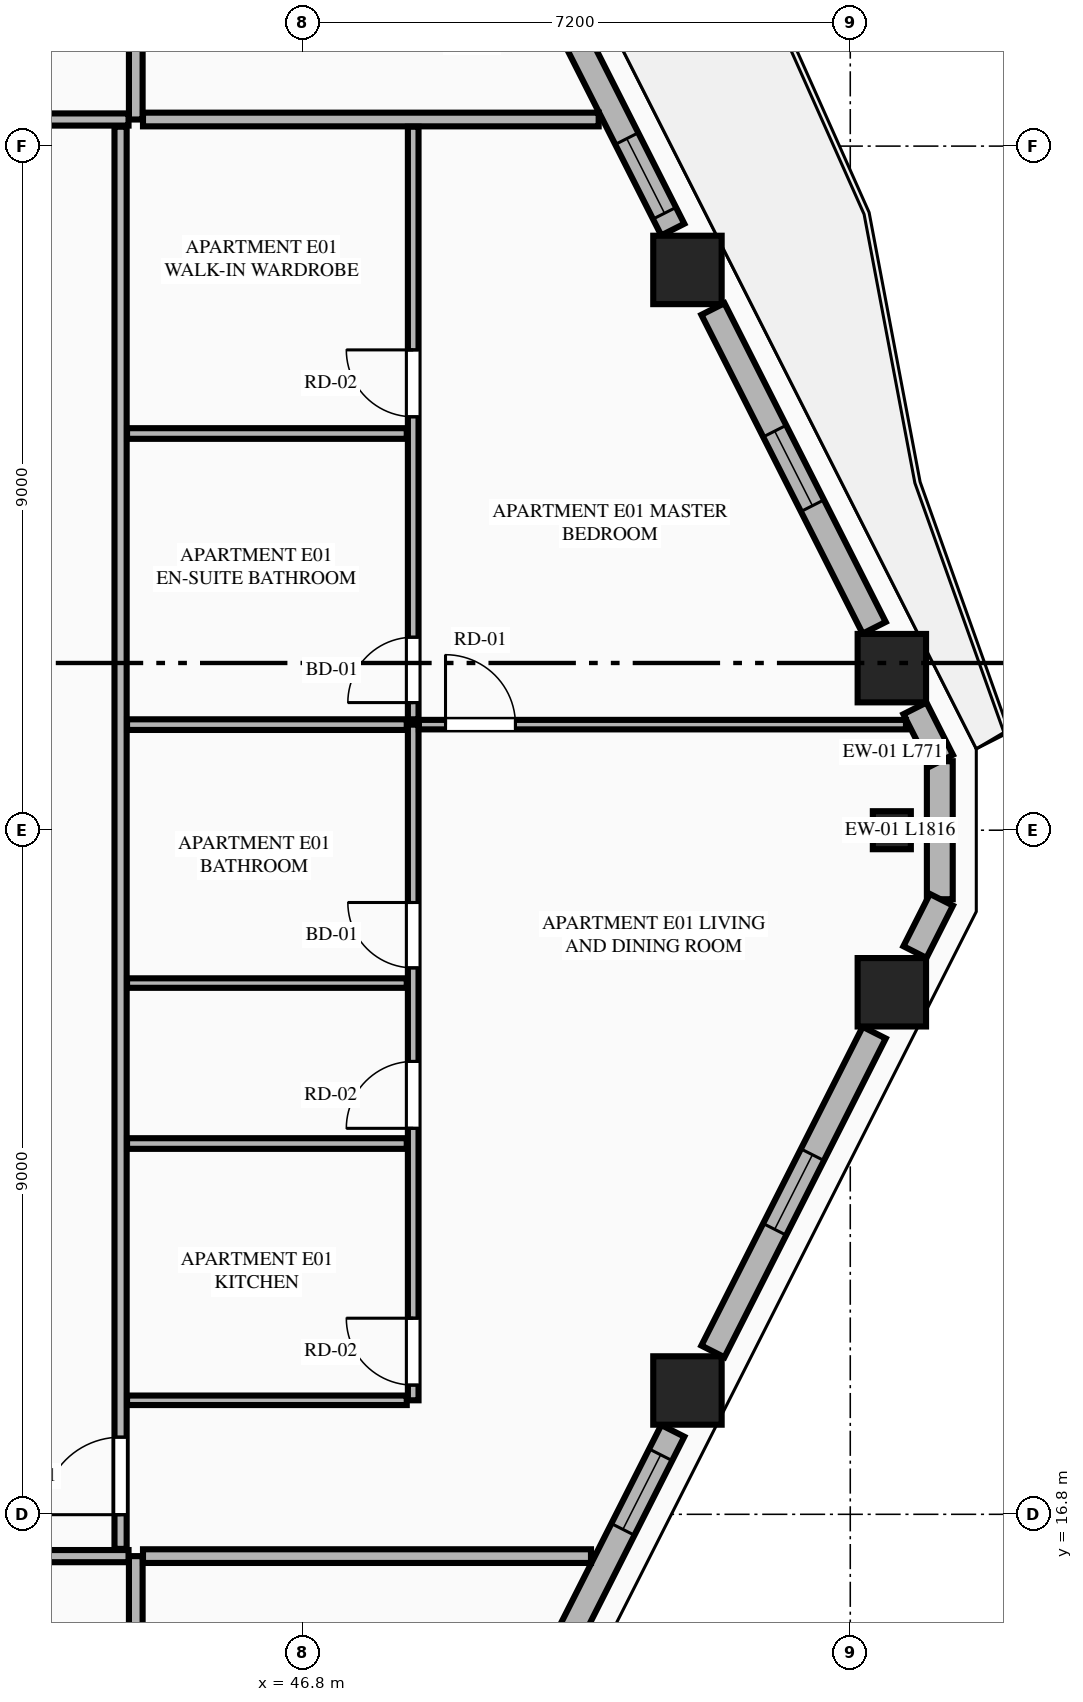
"""IFC4 building model, lengths in metres.
Left out: names, types, materials, properties, quantities, classifications, styles, units other than length and angle.
Written with IfcOpenShell. Run it as: python <this file> out.ifc"""

import sys

from ifc_helpers import new_model, si_unit, direction, frame, frame_2d, origin, origin_2d, place, context, subcontext, project, spatial, rectangle, extrude, element, fill, save


model = new_model("IFC4")
c1 = context("Model", 3, precision=1e-05, world=origin(), true_north=direction((0.0, 1.0)))
c2 = subcontext(c1, "Body", "Model", "MODEL_VIEW")
j1 = project(units=[si_unit("LENGTHUNIT", "METRE"), si_unit("PLANEANGLEUNIT", "RADIAN")], contexts=[c1])
p1 = place(None, origin())
s1 = spatial("IfcSite", under=j1, at=p1, CompositionType="ELEMENT")
p2 = place(p1, origin())
s2 = spatial("IfcBuilding", under=s1, at=p2, CompositionType="ELEMENT")
p3 = place(p2, frame((0.0, 0.0, 175.45)))
s3 = spatial("IfcBuildingStorey", under=s2, at=p3, CompositionType="ELEMENT", Elevation=175.45)
for number, where, z_axis, x_axis in (
    (1, (51.858, 18.429, 0.0), (0.0, 0.0, 1.0), (1.0, 0.0, 0.0)),
    (2, (54.547, 23.668, 0.0), (0.0, 0.0, 1.0), (1.0, 0.0, 0.0)),
    (3, (54.547, 27.932, 0.0), (0.0, 0.0, 1.0), (1.0, 0.0, 0.0)),
    (4, (51.858, 33.171, 0.0), (0.0, 0.0, 1.0), (1.0, 0.0, 0.0)),
):
    element("IfcColumn", number, at=place(p3, frame(where, z_axis=z_axis, x_axis=x_axis)), inside=s3, PredefinedType="COLUMN", context=c2, shape_type="SweptSolid", body=[
        extrude(rectangle(XDim=0.9, YDim=0.9, at=origin_2d()), origin(), (0.0, 0.0, 1.0), 3.55),
    ])
p4 = place(p3, frame((54.547, 25.8, 0.0), z_axis=(0.0, 0.0, 1.0), x_axis=(0.0, 1.0, 0.0)))
e5 = element("IfcColumn", 5, at=p4, inside=s3, PredefinedType="PILASTER", context=c2, shape_type="SweptSolid", body=[
    extrude(rectangle(XDim=0.5, YDim=0.35, at=origin_2d()), origin(), (0.0, 0.0, 1.0), 3.55),
])
p5 = place(p3, frame((55.178, 24.892, 0.0), z_axis=(0.0, 0.0, 1.0), x_axis=(0.0, 1.0, 0.0)))
e6 = element("IfcWall", 6, at=p5, inside=s3, PredefinedType="STANDARD", context=c2, shape_type="SweptSolid", body=[
    extrude(rectangle(XDim=1.816, YDim=0.34, at=frame_2d((0.908, 0.0))), origin(), (0.0, 0.0, 1.0), 3.35),
])
p6 = place(p3, frame((49.448, 13.517, 0.0), z_axis=(0.0, 0.0, 1.0), x_axis=(0.451544279509, 0.892248711763, 0.0)))
e7 = element("IfcWall", 7, at=p6, inside=s3, PredefinedType="STANDARD", context=c2, shape_type="SweptSolid", body=[
    extrude(rectangle(XDim=4.91, YDim=0.34, at=frame_2d((2.455, 0.0))), origin(), (0.0, 0.0, 1.0), 2.883),
])
p7 = place(p6, frame((0.851, 0.0, 0.75)))
e8 = element("IfcOpeningElement", 8, at=p7, cuts=e7, PredefinedType="OPENING", context=c2, shape_type="SweptSolid", body=[
    extrude(rectangle(XDim=1.1, YDim=1.983, at=frame_2d((0.55, 0.991))), frame((0.0, 0.18, 0.0), z_axis=(0.0, -1.0, 0.0), x_axis=(1.0, 0.0, 0.0)), (0.0, 0.0, 1.0), 0.36),
])
p8 = place(p6, frame((3.457, 0.0, 0.75)))
e9 = element("IfcOpeningElement", 9, at=p8, cuts=e7, PredefinedType="OPENING", context=c2, shape_type="SweptSolid", body=[
    extrude(rectangle(XDim=1.1, YDim=1.983, at=frame_2d((0.55, 0.991))), frame((0.0, 0.18, 0.0), z_axis=(0.0, -1.0, 0.0), x_axis=(1.0, 0.0, 0.0)), (0.0, 0.0, 1.0), 0.36),
])
p9 = place(p3, frame((52.193, 18.943, 0.0), z_axis=(0.0, 0.0, 1.0), x_axis=(0.451447222193, 0.892297823361, 0.0)))
e10 = element("IfcWall", 10, at=p9, inside=s3, PredefinedType="STANDARD", context=c2, shape_type="SweptSolid", body=[
    extrude(rectangle(XDim=4.7, YDim=0.34, at=frame_2d((2.35, 0.0))), origin(), (0.0, 0.0, 1.0), 2.883),
])
p10 = place(p9, frame((1.8, 0.0, 0.75)))
e11 = element("IfcOpeningElement", 11, at=p10, cuts=e10, PredefinedType="OPENING", context=c2, shape_type="SweptSolid", body=[
    extrude(rectangle(XDim=1.1, YDim=1.983, at=frame_2d((0.55, 0.991))), frame((0.0, 0.18, 0.0), z_axis=(0.0, -1.0, 0.0), x_axis=(1.0, 0.0, 0.0)), (0.0, 0.0, 1.0), 0.36),
])
for number, where, z_axis, x_axis in (
    (12, (54.851, 24.197, 0.0), (0.0, 0.0, 1.0), (0.451, 0.892, 0.0)),
    (13, (55.199, 26.715, 0.0), (0.0, 0.0, 1.0), (-0.451, 0.892, 0.0)),
):
    element("IfcWall", number, at=place(p3, frame(where, z_axis=z_axis, x_axis=x_axis)), inside=s3, PredefinedType="STANDARD", context=c2, shape_type="SweptSolid", body=[
        extrude(rectangle(XDim=0.771, YDim=0.34, at=frame_2d((0.385, 0.0))), origin(), (0.0, 0.0, 1.0), 3.35),
    ])
p11 = place(p3, frame((54.315, 28.463, 0.0), z_axis=(0.0, 0.0, 1.0), x_axis=(-0.451426298588, 0.892308409096, 0.0)))
e14 = element("IfcWall", 14, at=p11, inside=s3, PredefinedType="STANDARD", context=c2, shape_type="SweptSolid", body=[
    extrude(rectangle(XDim=4.7, YDim=0.34, at=frame_2d((2.35, 0.0))), origin(), (0.0, 0.0, 1.0), 2.883),
])
p12 = place(p11, frame((1.8, 0.0, 0.75)))
e15 = element("IfcOpeningElement", 15, at=p12, cuts=e14, PredefinedType="OPENING", context=c2, shape_type="SweptSolid", body=[
    extrude(rectangle(XDim=1.1, YDim=1.983, at=frame_2d((0.55, 0.991))), frame((0.0, 0.18, 0.0), z_axis=(0.0, -1.0, 0.0), x_axis=(1.0, 0.0, 0.0)), (0.0, 0.0, 1.0), 0.36),
])
p13 = place(p3, frame((51.665, 33.702, 0.0), z_axis=(0.0, 0.0, 1.0), x_axis=(-0.451524246964, 0.89225884944, 0.0)))
e16 = element("IfcWall", 16, at=p13, inside=s3, PredefinedType="STANDARD", context=c2, shape_type="SweptSolid", body=[
    extrude(rectangle(XDim=4.91, YDim=0.34, at=frame_2d((2.455, 0.0))), origin(), (0.0, 0.0, 1.0), 2.883),
])
p14 = place(p13, frame((2.842, 0.0, 0.0)))
e17 = element("IfcOpeningElement", 17, at=p14, cuts=e16, PredefinedType="OPENING", context=c2, shape_type="SweptSolid", body=[
    extrude(rectangle(XDim=1.1, YDim=2.25, at=frame_2d((0.55, 1.125))), frame((0.0, 0.18, 0.0), z_axis=(0.0, -1.0, 0.0), x_axis=(1.0, 0.0, 0.0)), (0.0, 0.0, 1.0), 0.36),
])
p15 = place(p13, frame((0.241, 0.0, 0.75)))
e18 = element("IfcOpeningElement", 18, at=p15, cuts=e16, PredefinedType="OPENING", context=c2, shape_type="SweptSolid", body=[
    extrude(rectangle(XDim=1.1, YDim=1.983, at=frame_2d((0.55, 0.991))), frame((0.0, 0.18, 0.0), z_axis=(0.0, -1.0, 0.0), x_axis=(1.0, 0.0, 0.0)), (0.0, 0.0, 1.0), 0.36),
])
p16 = place(p3, frame((44.6, 5.968, 0.0), z_axis=(0.0, 0.0, 1.0), x_axis=(0.0, 1.0, 0.0)))
e19 = element("IfcWall", 19, at=p16, inside=s3, PredefinedType="PARTITIONING", context=c2, shape_type="SweptSolid", body=[
    extrude(rectangle(XDim=10.282, YDim=0.18, at=frame_2d((5.141, 0.0))), origin(), (0.0, 0.0, 1.0), 3.35),
])
p17 = place(p3, frame((28.952, 16.25, 0.0), z_axis=(0.0, 0.0, 1.0), x_axis=(1.0, 0.0, 0.0)))
e20 = element("IfcWall", 20, at=p17, inside=s3, PredefinedType="PARTITIONING", context=c2, shape_type="SweptSolid", body=[
    extrude(rectangle(XDim=15.553, YDim=0.16, at=frame_2d((7.776, 0.0))), origin(), (0.0, 0.0, 1.0), 3.35),
])
p18 = place(p17, frame((0.355, 0.0, 0.0)))
e21 = element("IfcOpeningElement", 21, at=p18, cuts=e20, PredefinedType="OPENING", context=c2, shape_type="SweptSolid", body=[
    extrude(rectangle(XDim=1.02, YDim=2.25, at=frame_2d((0.51, 1.125))), frame((0.0, 0.09, 0.0), z_axis=(0.0, -1.0, 0.0), x_axis=(1.0, 0.0, 0.0)), (0.0, 0.0, 1.0), 0.18),
])
p19 = place(p3, frame((44.6, 35.15, 0.0), z_axis=(0.0, 0.0, 1.0), x_axis=(0.0, 1.0, 0.0)))
e22 = element("IfcWall", 22, at=p19, inside=s3, PredefinedType="PARTITIONING", context=c2, shape_type="SweptSolid", body=[
    extrude(rectangle(XDim=10.482, YDim=0.18, at=frame_2d((5.241, 0.0))), origin(), (0.0, 0.0, 1.0), 3.35),
])
p20 = place(p3, frame((36.038, 35.15, 0.0), z_axis=(0.0, 0.0, 1.0), x_axis=(1.0, 0.0, 0.0)))
e23 = element("IfcWall", 23, at=p20, inside=s3, PredefinedType="PARTITIONING", context=c2, shape_type="SweptSolid", body=[
    extrude(rectangle(XDim=8.467, YDim=0.16, at=frame_2d((4.233, 0.0))), origin(), (0.0, 0.0, 1.0), 3.35),
])
p21 = place(p20, frame((6.212, 0.0, 0.0)))
e24 = element("IfcOpeningElement", 24, at=p21, cuts=e23, PredefinedType="OPENING", context=c2, shape_type="SweptSolid", body=[
    extrude(rectangle(XDim=1.02, YDim=2.25, at=frame_2d((0.51, 1.125))), frame((0.0, 0.09, 0.0), z_axis=(0.0, -1.0, 0.0), x_axis=(1.0, 0.0, 0.0)), (0.0, 0.0, 1.0), 0.18),
])
p22 = place(p3, frame((44.695, 16.25, 0.0), z_axis=(0.0, 0.0, 1.0), x_axis=(1.0, 0.0, 0.0)))
e25 = element("IfcWall", 25, at=p22, inside=s3, PredefinedType="PARTITIONING", context=c2, shape_type="SweptSolid", body=[
    extrude(rectangle(XDim=5.894, YDim=0.18, at=frame_2d((2.947, 0.0))), origin(), (0.0, 0.0, 1.0), 3.35),
])
p23 = place(p3, frame((44.695, 35.15, 0.0), z_axis=(0.0, 0.0, 1.0), x_axis=(1.0, 0.0, 0.0)))
e26 = element("IfcWall", 26, at=p23, inside=s3, PredefinedType="PARTITIONING", context=c2, shape_type="SweptSolid", body=[
    extrude(rectangle(XDim=5.995, YDim=0.18, at=frame_2d((2.998, 0.0))), origin(), (0.0, 0.0, 1.0), 3.35),
])
p24 = place(p3, frame((44.4, 16.345, 0.0), z_axis=(0.0, 0.0, 1.0), x_axis=(0.0, 1.0, 0.0)))
e27 = element("IfcWall", 27, at=p24, inside=s3, PredefinedType="PARTITIONING", context=c2, shape_type="SweptSolid", body=[
    extrude(rectangle(XDim=18.71, YDim=0.16, at=frame_2d((9.355, 0.0))), origin(), (0.0, 0.0, 1.0), 3.35),
])
p25 = place(p24, frame((0.45, 0.0, 0.0)))
e28 = element("IfcOpeningElement", 28, at=p25, cuts=e27, PredefinedType="OPENING", context=c2, shape_type="SweptSolid", body=[
    extrude(rectangle(XDim=1.02, YDim=2.25, at=frame_2d((0.51, 1.125))), frame((0.0, 0.09, 0.0), z_axis=(0.0, -1.0, 0.0), x_axis=(1.0, 0.0, 0.0)), (0.0, 0.0, 1.0), 0.18),
])
p26 = place(p3, frame((44.485, 18.3, 0.0), z_axis=(0.0, 0.0, 1.0), x_axis=(1.0, 0.0, 0.0)))
e29 = element("IfcWall", 29, at=p26, inside=s3, PredefinedType="PARTITIONING", context=c2, shape_type="SweptSolid", body=[
    extrude(rectangle(XDim=3.68, YDim=0.125, at=frame_2d((1.84, 0.0))), origin(), (0.0, 0.0, 1.0), 2.807),
])
p27 = place(p3, frame((48.25, 18.3, 0.0), z_axis=(0.0, 0.0, 1.0), x_axis=(0.0, 1.0, 0.0)))
e30 = element("IfcWall", 30, at=p27, inside=s3, PredefinedType="PLUMBINGWALL", context=c2, shape_type="SweptSolid", body=[
    extrude(rectangle(XDim=8.889, YDim=0.14, at=frame_2d((4.444, 0.0))), origin(), (0.0, 0.0, 1.0), 3.35),
])
p28 = place(p27, frame((0.2, 0.0, 0.0)))
e31 = element("IfcOpeningElement", 31, at=p28, cuts=e30, PredefinedType="OPENING", context=c2, shape_type="SweptSolid", body=[
    extrude(rectangle(XDim=0.88, YDim=2.15, at=frame_2d((0.44, 1.075))), frame((0.0, 0.08, 0.0), z_axis=(0.0, -1.0, 0.0), x_axis=(1.0, 0.0, 0.0)), (0.0, 0.0, 1.0), 0.16),
])
p29 = place(p27, frame((3.578, 0.0, 0.0)))
e32 = element("IfcOpeningElement", 32, at=p29, cuts=e30, PredefinedType="OPENING", context=c2, shape_type="SweptSolid", body=[
    extrude(rectangle(XDim=0.88, YDim=2.15, at=frame_2d((0.44, 1.075))), frame((0.0, 0.08, 0.0), z_axis=(0.0, -1.0, 0.0), x_axis=(1.0, 0.0, 0.0)), (0.0, 0.0, 1.0), 0.16),
])
p30 = place(p27, frame((5.689, 0.0, 0.0)))
e33 = element("IfcOpeningElement", 33, at=p30, cuts=e30, PredefinedType="OPENING", context=c2, shape_type="SweptSolid", body=[
    extrude(rectangle(XDim=0.86, YDim=2.1, at=frame_2d((0.43, 1.05))), frame((0.0, 0.08, 0.0), z_axis=(0.0, -1.0, 0.0), x_axis=(1.0, 0.0, 0.0)), (0.0, 0.0, 1.0), 0.16),
])
p31 = place(p3, frame((48.25, 27.259, 0.0), z_axis=(0.0, 0.0, 1.0), x_axis=(0.0, 1.0, 0.0)))
e34 = element("IfcWall", 34, at=p31, inside=s3, PredefinedType="PLUMBINGWALL", context=c2, shape_type="SweptSolid", body=[
    extrude(rectangle(XDim=7.796, YDim=0.14, at=frame_2d((3.898, 0.0))), origin(), (0.0, 0.0, 1.0), 3.35),
])
p32 = place(p31, frame((0.22, 0.0, 0.0)))
e35 = element("IfcOpeningElement", 35, at=p32, cuts=e34, PredefinedType="OPENING", context=c2, shape_type="SweptSolid", body=[
    extrude(rectangle(XDim=0.86, YDim=2.1, at=frame_2d((0.43, 1.05))), frame((0.0, 0.08, 0.0), z_axis=(0.0, -1.0, 0.0), x_axis=(1.0, 0.0, 0.0)), (0.0, 0.0, 1.0), 0.16),
])
p33 = place(p31, frame((3.98, 0.0, 0.0)))
e36 = element("IfcOpeningElement", 36, at=p33, cuts=e34, PredefinedType="OPENING", context=c2, shape_type="SweptSolid", body=[
    extrude(rectangle(XDim=0.88, YDim=2.15, at=frame_2d((0.44, 1.075))), frame((0.0, 0.08, 0.0), z_axis=(0.0, -1.0, 0.0), x_axis=(1.0, 0.0, 0.0)), (0.0, 0.0, 1.0), 0.16),
])
p34 = place(p3, frame((44.485, 27.189, 0.0), z_axis=(0.0, 0.0, 1.0), x_axis=(1.0, 0.0, 0.0)))
e37 = element("IfcWall", 37, at=p34, inside=s3, PredefinedType="PLUMBINGWALL", context=c2, shape_type="SweptSolid", body=[
    extrude(rectangle(XDim=3.68, YDim=0.14, at=frame_2d((1.84, 0.0))), origin(), (0.0, 0.0, 1.0), 3.35),
])
p35 = place(p3, frame((48.325, 27.189, 0.0), z_axis=(0.0, 0.0, 1.0), x_axis=(1.0, 0.0, 0.0)))
e38 = element("IfcWall", 38, at=p35, inside=s3, PredefinedType="PARTITIONING", context=c2, shape_type="SweptSolid", body=[
    extrude(rectangle(XDim=6.408, YDim=0.125, at=frame_2d((3.204, 0.0))), origin(), (0.0, 0.0, 1.0), 3.35),
])
p36 = place(p35, frame((0.35, 0.0, 0.0)))
e39 = element("IfcOpeningElement", 39, at=p36, cuts=e38, PredefinedType="OPENING", context=c2, shape_type="SweptSolid", body=[
    extrude(rectangle(XDim=0.92, YDim=2.15, at=frame_2d((0.46, 1.075))), frame((0.0, 0.073, 0.0), z_axis=(0.0, -1.0, 0.0), x_axis=(1.0, 0.0, 0.0)), (0.0, 0.0, 1.0), 0.145),
])
p37 = place(p3, frame((44.485, 21.678, 0.0), z_axis=(0.0, 0.0, 1.0), x_axis=(1.0, 0.0, 0.0)))
e40 = element("IfcWall", 40, at=p37, inside=s3, PredefinedType="PLUMBINGWALL", context=c2, shape_type="SweptSolid", body=[
    extrude(rectangle(XDim=3.68, YDim=0.14, at=frame_2d((1.84, 0.0))), origin(), (0.0, 0.0, 1.0), 3.35),
])
p38 = place(p3, frame((44.485, 23.789, 0.0), z_axis=(0.0, 0.0, 1.0), x_axis=(1.0, 0.0, 0.0)))
e41 = element("IfcWall", 41, at=p38, inside=s3, PredefinedType="PARTITIONING", context=c2, shape_type="SweptSolid", body=[
    extrude(rectangle(XDim=3.68, YDim=0.125, at=frame_2d((1.84, 0.0))), origin(), (0.0, 0.0, 1.0), 2.807),
])
p39 = place(p3, frame((44.485, 31.019, 0.0), z_axis=(0.0, 0.0, 1.0), x_axis=(1.0, 0.0, 0.0)))
e42 = element("IfcWall", 42, at=p39, inside=s3, PredefinedType="PLUMBINGWALL", context=c2, shape_type="SweptSolid", body=[
    extrude(rectangle(XDim=3.68, YDim=0.14, at=frame_2d((1.84, 0.0))), origin(), (0.0, 0.0, 1.0), 3.35),
])
p40 = place(p10, origin())
e43 = element("IfcWindow", 43, at=p40, inside=s3, PartitioningType="SINGLE_PANEL", PredefinedType="WINDOW", context=c2, shape_type="SweptSolid", body=[
    extrude(rectangle(XDim=1.1, YDim=1.983, at=frame_2d((0.55, 0.991))), frame((0.0, 0.03, 0.0), z_axis=(0.0, -1.0, 0.0), x_axis=(1.0, 0.0, 0.0)), (0.0, 0.0, 1.0), 0.06),
])
fill(e11, e43)
p41 = place(p12, origin())
e44 = element("IfcWindow", 44, at=p41, inside=s3, PartitioningType="SINGLE_PANEL", PredefinedType="WINDOW", context=c2, shape_type="SweptSolid", body=[
    extrude(rectangle(XDim=1.1, YDim=1.983, at=frame_2d((0.55, 0.991))), frame((0.0, 0.03, 0.0), z_axis=(0.0, -1.0, 0.0), x_axis=(1.0, 0.0, 0.0)), (0.0, 0.0, 1.0), 0.06),
])
fill(e15, e44)
p42 = place(p28, origin())
e45 = element("IfcDoor", 45, at=p42, inside=s3, OperationType="SINGLE_SWING_RIGHT", PredefinedType="DOOR", context=c2, shape_type="SweptSolid", body=[
    extrude(rectangle(XDim=0.88, YDim=2.15, at=frame_2d((0.44, 1.075))), frame((0.0, 0.025, 0.0), z_axis=(0.0, -1.0, 0.0), x_axis=(1.0, 0.0, 0.0)), (0.0, 0.0, 1.0), 0.05),
])
fill(e31, e45)
p43 = place(p29, origin())
e46 = element("IfcDoor", 46, at=p43, inside=s3, OperationType="SINGLE_SWING_LEFT", PredefinedType="DOOR", context=c2, shape_type="SweptSolid", body=[
    extrude(rectangle(XDim=0.88, YDim=2.15, at=frame_2d((0.44, 1.075))), frame((0.0, 0.025, 0.0), z_axis=(0.0, -1.0, 0.0), x_axis=(1.0, 0.0, 0.0)), (0.0, 0.0, 1.0), 0.05),
])
fill(e32, e46)
p44 = place(p30, origin())
e47 = element("IfcDoor", 47, at=p44, inside=s3, OperationType="SINGLE_SWING_RIGHT", PredefinedType="DOOR", context=c2, shape_type="SweptSolid", body=[
    extrude(rectangle(XDim=0.86, YDim=2.1, at=frame_2d((0.43, 1.05))), frame((0.0, 0.025, 0.0), z_axis=(0.0, -1.0, 0.0), x_axis=(1.0, 0.0, 0.0)), (0.0, 0.0, 1.0), 0.05),
])
fill(e33, e47)
p45 = place(p32, origin())
e48 = element("IfcDoor", 48, at=p45, inside=s3, OperationType="SINGLE_SWING_LEFT", PredefinedType="DOOR", context=c2, shape_type="SweptSolid", body=[
    extrude(rectangle(XDim=0.86, YDim=2.1, at=frame_2d((0.43, 1.05))), frame((0.0, 0.025, 0.0), z_axis=(0.0, -1.0, 0.0), x_axis=(1.0, 0.0, 0.0)), (0.0, 0.0, 1.0), 0.05),
])
fill(e35, e48)
p46 = place(p33, origin())
e49 = element("IfcDoor", 49, at=p46, inside=s3, OperationType="SINGLE_SWING_RIGHT", PredefinedType="DOOR", context=c2, shape_type="SweptSolid", body=[
    extrude(rectangle(XDim=0.88, YDim=2.15, at=frame_2d((0.44, 1.075))), frame((0.0, 0.025, 0.0), z_axis=(0.0, -1.0, 0.0), x_axis=(1.0, 0.0, 0.0)), (0.0, 0.0, 1.0), 0.05),
])
fill(e36, e49)
p47 = place(p25, origin())
e50 = element("IfcDoor", 50, at=p47, inside=s3, OperationType="SINGLE_SWING_LEFT", PredefinedType="DOOR", context=c2, shape_type="SweptSolid", body=[
    extrude(rectangle(XDim=1.02, YDim=2.25, at=frame_2d((0.51, 1.125))), frame((0.0, 0.025, 0.0), z_axis=(0.0, -1.0, 0.0), x_axis=(1.0, 0.0, 0.0)), (0.0, 0.0, 1.0), 0.05),
])
fill(e28, e50)
p48 = place(p36, origin())
e51 = element("IfcDoor", 51, at=p48, inside=s3, OperationType="SINGLE_SWING_LEFT", PredefinedType="DOOR", context=c2, shape_type="SweptSolid", body=[
    extrude(rectangle(XDim=0.92, YDim=2.15, at=frame_2d((0.46, 1.075))), frame((0.0, 0.025, 0.0), z_axis=(0.0, -1.0, 0.0), x_axis=(1.0, 0.0, 0.0)), (0.0, 0.0, 1.0), 0.05),
])
fill(e39, e51)
p49 = place(p8, origin())
e52 = element("IfcWindow", 52, at=p49, inside=s3, PartitioningType="SINGLE_PANEL", PredefinedType="WINDOW", context=c2, shape_type="SweptSolid", body=[
    extrude(rectangle(XDim=1.1, YDim=1.983, at=frame_2d((0.55, 0.991))), frame((0.0, 0.03, 0.0), z_axis=(0.0, -1.0, 0.0), x_axis=(1.0, 0.0, 0.0)), (0.0, 0.0, 1.0), 0.06),
])
fill(e9, e52)
p50 = place(p15, origin())
e53 = element("IfcWindow", 53, at=p50, inside=s3, PartitioningType="SINGLE_PANEL", PredefinedType="WINDOW", context=c2, shape_type="SweptSolid", body=[
    extrude(rectangle(XDim=1.1, YDim=1.983, at=frame_2d((0.55, 0.991))), frame((0.0, 0.03, 0.0), z_axis=(0.0, -1.0, 0.0), x_axis=(1.0, 0.0, 0.0)), (0.0, 0.0, 1.0), 0.06),
])
fill(e18, e53)
save(model, sys.argv[1])
